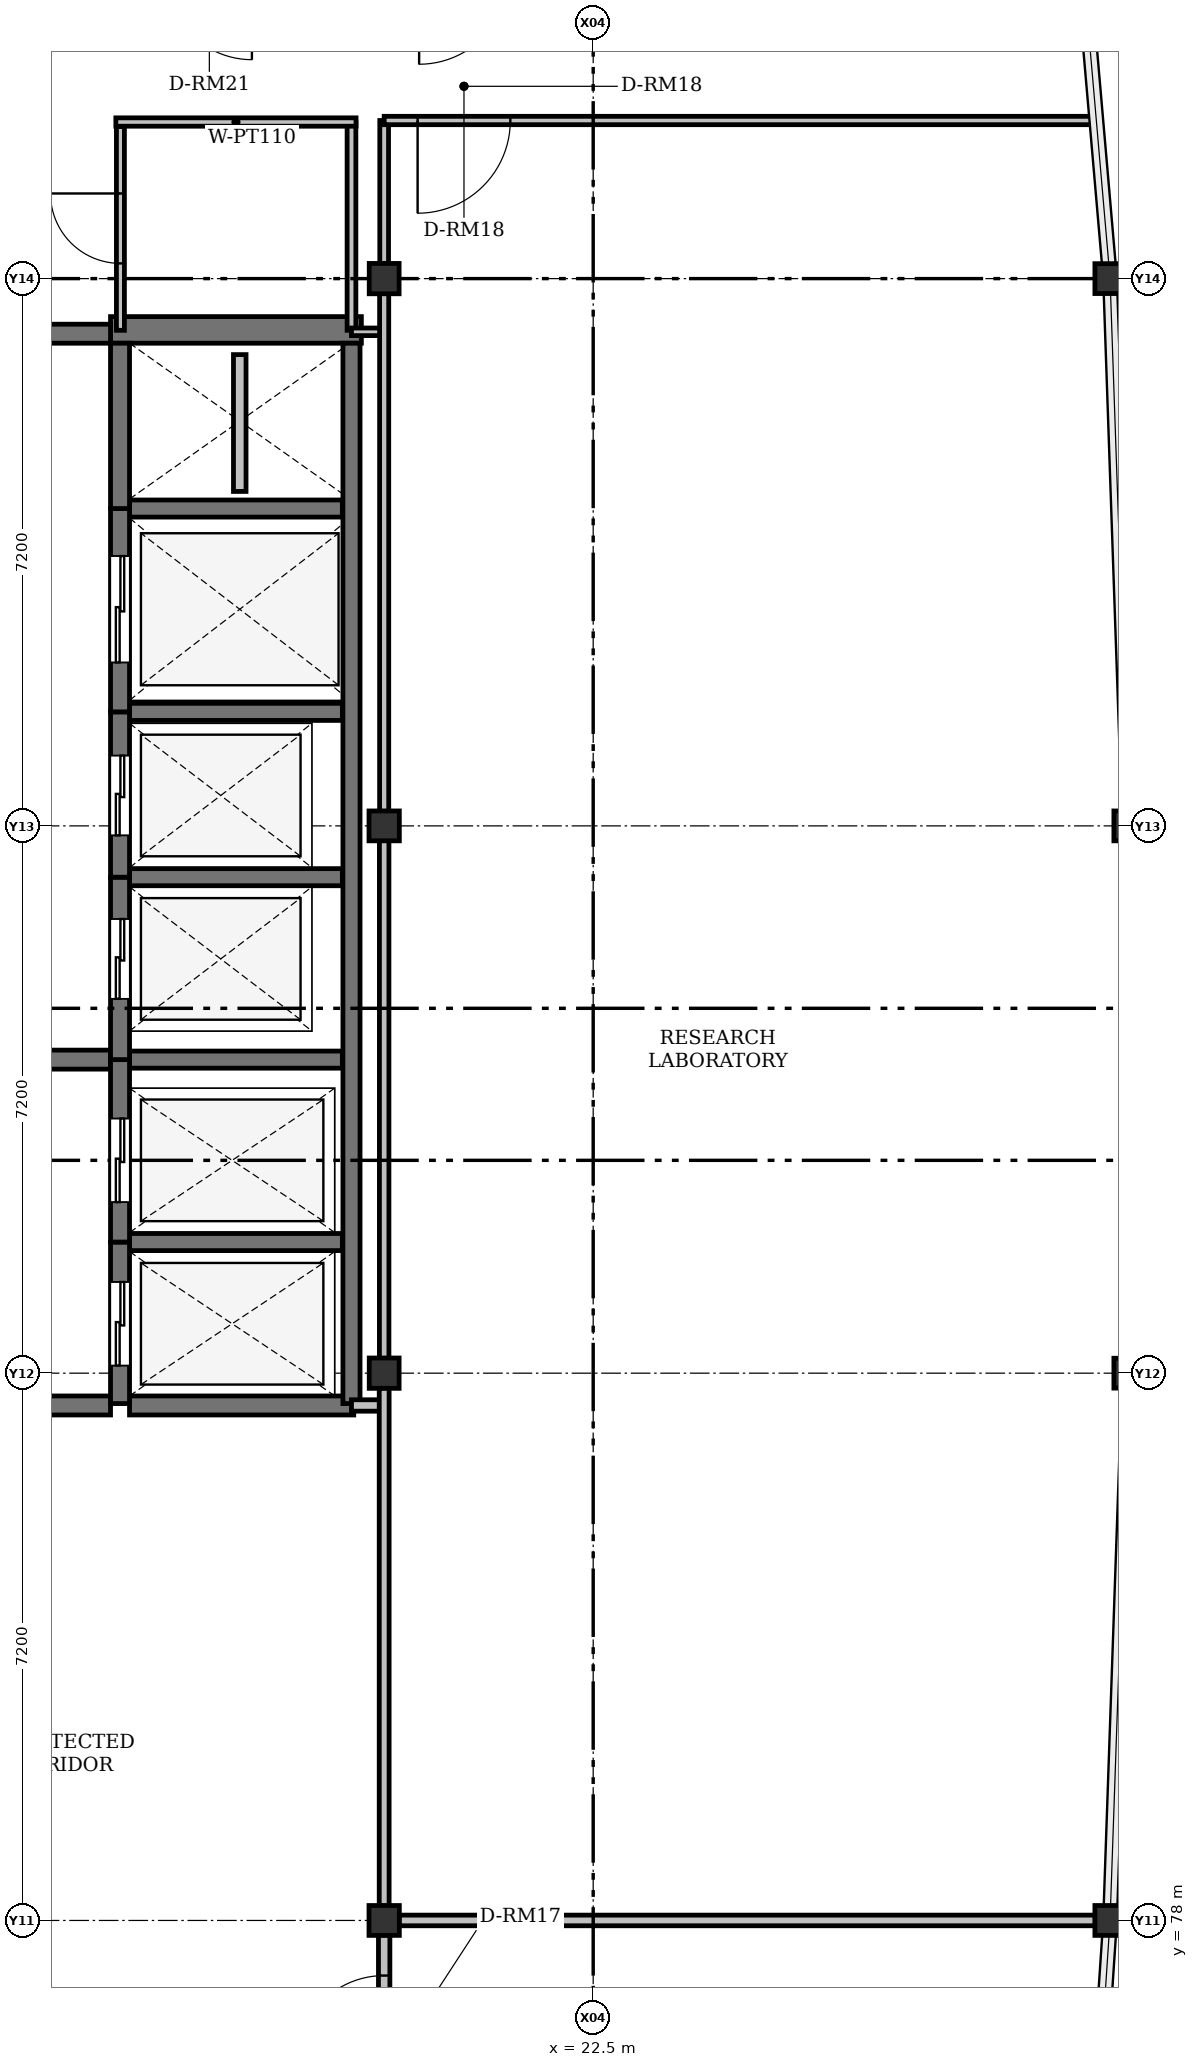
"""IFC4 building model, lengths in metres.
Left out: names, types, materials, properties, quantities, classifications, styles, units other than length and angle.
Written with IfcOpenShell. Run it as: python <this file> out.ifc"""

import sys

from ifc_helpers import new_model, si_unit, direction, frame, frame_2d, origin, origin_2d, place, context, subcontext, project, spatial, rectangle, i_section, extrude, element, fill, save


model = new_model("IFC4")
c1 = context("Model", 3, precision=1e-05, world=origin(), true_north=direction((0.0, 1.0)))
c2 = subcontext(c1, "Body", "Model", "MODEL_VIEW")
j1 = project(units=[si_unit("LENGTHUNIT", "METRE"), si_unit("PLANEANGLEUNIT", "RADIAN")], contexts=[c1])
p1 = place(None, origin())
s1 = spatial("IfcSite", under=j1, at=p1, CompositionType="ELEMENT")
p2 = place(p1, origin())
s2 = spatial("IfcBuilding", under=s1, at=p2, CompositionType="ELEMENT")
p3 = place(p2, origin())
s3 = spatial("IfcBuildingStorey", under=s2, at=p3, CompositionType="ELEMENT", Elevation=0.0)
for number, where, z_axis, x_axis in (
    (1, (19.75, 78.0, 0.0), (0.0, 0.0, 1.0), (1.0, 0.0, 0.0)),
    (2, (29.3, 78.0, 0.0), (0.0, 0.0, 1.0), (1.0, 0.0, 0.0)),
    (3, (19.75, 85.2, 0.0), (0.0, 0.0, 1.0), (0.0, 1.0, 0.0)),
    (4, (29.55, 85.2, 0.0), (0.0, 0.0, 1.0), (1.0, 0.0, 0.0)),
    (5, (19.75, 92.4, 0.0), (0.0, 0.0, 1.0), (1.0, 0.0, 0.0)),
    (6, (29.55, 92.4, 0.0), (0.0, 0.0, 1.0), (1.0, 0.0, 0.0)),
    (7, (19.75, 99.6, 0.0), (0.0, 0.0, 1.0), (0.0, 1.0, 0.0)),
    (8, (29.3, 99.6, 0.0), (0.0, 0.0, 1.0), (1.0, 0.0, 0.0)),
):
    element("IfcColumn", number, at=place(p3, frame(where, z_axis=z_axis, x_axis=x_axis)), inside=s3, PredefinedType="COLUMN", context=c2, shape_type="SweptSolid", body=[
        extrude(i_section(OverallWidth=0.399, OverallDepth=0.393, WebThickness=0.023, FlangeThickness=0.036, FilletRadius=0.015, at=origin_2d()), origin(), (0.0, 0.0, 1.0), 5.4),
    ])
p4 = place(p3, frame((16.15, 98.925, 0.0), z_axis=(0.0, 0.0, 1.0), x_axis=(1.0, 0.0, 0.0)))
e9 = element("IfcWall", 9, at=p4, inside=s3, PredefinedType="SHEAR", context=c2, shape_type="SweptSolid", body=[
    extrude(rectangle(XDim=3.3, YDim=0.35, at=frame_2d((1.65, 0.0))), origin(), (0.0, 0.0, 1.0), 5.4),
])
p5 = place(p3, frame((12.12, 98.875, 0.0), z_axis=(0.0, 0.0, 1.0), x_axis=(1.0, 0.0, 0.0)))
e10 = element("IfcWall", 10, at=p5, inside=s3, PredefinedType="SHEAR", context=c2, shape_type="SweptSolid", body=[
    extrude(rectangle(XDim=4.03, YDim=0.25, at=frame_2d((2.015, 0.0))), origin(), (0.0, 0.0, 1.0), 5.4),
])
p6 = place(p5, frame((1.35, 0.0, 0.0)))
e11 = element("IfcOpeningElement", 11, at=p6, cuts=e10, PredefinedType="OPENING", context=c2, shape_type="SweptSolid", body=[
    extrude(rectangle(XDim=1.3, YDim=2.2, at=frame_2d((0.65, 1.1))), frame((0.0, 0.125, 0.0), z_axis=(0.0, -1.0, 0.0), x_axis=(1.0, 0.0, 0.0)), (0.0, 0.0, 1.0), 0.25),
])
p7 = place(p3, frame((12.12, 89.325, 0.0), z_axis=(0.0, 0.0, 1.0), x_axis=(1.0, 0.0, 0.0)))
e12 = element("IfcWall", 12, at=p7, inside=s3, PredefinedType="SHEAR", context=c2, shape_type="SweptSolid", body=[
    extrude(rectangle(XDim=4.03, YDim=0.25, at=frame_2d((2.015, 0.0))), origin(), (0.0, 0.0, 1.0), 5.4),
])
p8 = place(p7, frame((1.35, 0.0, 0.0)))
e13 = element("IfcOpeningElement", 13, at=p8, cuts=e12, PredefinedType="OPENING", context=c2, shape_type="SweptSolid", body=[
    extrude(rectangle(XDim=1.3, YDim=2.2, at=frame_2d((0.65, 1.1))), frame((0.0, 0.125, 0.0), z_axis=(0.0, -1.0, 0.0), x_axis=(1.0, 0.0, 0.0)), (0.0, 0.0, 1.0), 0.25),
])
p9 = place(p3, frame((12.12, 84.775, 0.0), z_axis=(0.0, 0.0, 1.0), x_axis=(1.0, 0.0, 0.0)))
e14 = element("IfcWall", 14, at=p9, inside=s3, PredefinedType="SHEAR", context=c2, shape_type="SweptSolid", body=[
    extrude(rectangle(XDim=4.03, YDim=0.25, at=frame_2d((2.015, 0.0))), origin(), (0.0, 0.0, 1.0), 5.4),
])
p10 = place(p9, frame((1.3, 0.0, 0.0)))
e15 = element("IfcOpeningElement", 15, at=p10, cuts=e14, PredefinedType="OPENING", context=c2, shape_type="SweptSolid", body=[
    extrude(rectangle(XDim=1.4, YDim=2.25, at=frame_2d((0.7, 1.125))), frame((0.0, 0.125, 0.0), z_axis=(0.0, -1.0, 0.0), x_axis=(1.0, 0.0, 0.0)), (0.0, 0.0, 1.0), 0.25),
])
p11 = place(p3, frame((16.4, 84.775, 0.0), z_axis=(0.0, 0.0, 1.0), x_axis=(1.0, 0.0, 0.0)))
e16 = element("IfcWall", 16, at=p11, inside=s3, PredefinedType="SHEAR", context=c2, shape_type="SweptSolid", body=[
    extrude(rectangle(XDim=2.95, YDim=0.25, at=frame_2d((1.475, 0.0))), origin(), (0.0, 0.0, 1.0), 5.4),
])
p12 = place(p3, frame((19.32, 84.8, 0.0), z_axis=(0.0, 0.0, 1.0), x_axis=(0.0, 1.0, 0.0)))
e17 = element("IfcWall", 17, at=p12, inside=s3, PredefinedType="SHEAR", context=c2, shape_type="SweptSolid", body=[
    extrude(rectangle(XDim=13.95, YDim=0.225, at=frame_2d((6.975, 0.0))), origin(), (0.0, 0.0, 1.0), 5.4),
])
for number, where, z_axis, x_axis in (
    (18, (16.4, 86.925, 0.0), (0.0, 0.0, 1.0), (1.0, 0.0, 0.0)),
    (19, (16.4, 89.325, 0.0), (0.0, 0.0, 1.0), (1.0, 0.0, 0.0)),
    (20, (16.4, 91.725, 0.0), (0.0, 0.0, 1.0), (1.0, 0.0, 0.0)),
    (21, (16.4, 93.9, 0.0), (0.0, 0.0, 1.0), (1.0, 0.0, 0.0)),
    (22, (16.4, 96.575, 0.0), (0.0, 0.0, 1.0), (1.0, 0.0, 0.0)),
):
    element("IfcWall", number, at=place(p3, frame(where, z_axis=z_axis, x_axis=x_axis)), inside=s3, PredefinedType="SHEAR", context=c2, shape_type="SweptSolid", body=[
        extrude(rectangle(XDim=2.8, YDim=0.225, at=frame_2d((1.4, 0.0))), origin(), (0.0, 0.0, 1.0), 5.4),
    ])
p13 = place(p3, frame((16.275, 84.8, 0.0), z_axis=(0.0, 0.0, 1.0), x_axis=(0.0, 1.0, 0.0)))
e23 = element("IfcWall", 23, at=p13, inside=s3, PredefinedType="SHEAR", context=c2, shape_type="SweptSolid", body=[
    extrude(rectangle(XDim=2.125, YDim=0.25, at=frame_2d((1.062, 0.0))), origin(), (0.0, 0.0, 1.0), 5.4),
])
p14 = place(p13, frame((0.5, 0.0, 0.0)))
e24 = element("IfcOpeningElement", 24, at=p14, cuts=e23, PredefinedType="OPENING", context=c2, shape_type="SweptSolid", body=[
    extrude(rectangle(XDim=1.1, YDim=2.15, at=frame_2d((0.55, 1.075))), frame((0.0, 0.125, 0.0), z_axis=(0.0, -1.0, 0.0), x_axis=(1.0, 0.0, 0.0)), (0.0, 0.0, 1.0), 0.25),
])
p15 = place(p3, frame((16.275, 86.925, 0.0), z_axis=(0.0, 0.0, 1.0), x_axis=(0.0, 1.0, 0.0)))
e25 = element("IfcWall", 25, at=p15, inside=s3, PredefinedType="SHEAR", context=c2, shape_type="SweptSolid", body=[
    extrude(rectangle(XDim=2.4, YDim=0.25, at=frame_2d((1.2, 0.0))), origin(), (0.0, 0.0, 1.0), 5.4),
])
p16 = place(p15, frame((0.525, 0.0, 0.0)))
e26 = element("IfcOpeningElement", 26, at=p16, cuts=e25, PredefinedType="OPENING", context=c2, shape_type="SweptSolid", body=[
    extrude(rectangle(XDim=1.1, YDim=2.15, at=frame_2d((0.55, 1.075))), frame((0.0, 0.125, 0.0), z_axis=(0.0, -1.0, 0.0), x_axis=(1.0, 0.0, 0.0)), (0.0, 0.0, 1.0), 0.25),
])
p17 = place(p3, frame((16.275, 89.325, 0.0), z_axis=(0.0, 0.0, 1.0), x_axis=(0.0, 1.0, 0.0)))
e27 = element("IfcWall", 27, at=p17, inside=s3, PredefinedType="SHEAR", context=c2, shape_type="SweptSolid", body=[
    extrude(rectangle(XDim=2.4, YDim=0.25, at=frame_2d((1.2, 0.0))), origin(), (0.0, 0.0, 1.0), 5.4),
])
p18 = place(p17, frame((0.8, 0.0, 0.0)))
e28 = element("IfcOpeningElement", 28, at=p18, cuts=e27, PredefinedType="OPENING", context=c2, shape_type="SweptSolid", body=[
    extrude(rectangle(XDim=1.05, YDim=2.15, at=frame_2d((0.525, 1.075))), frame((0.0, 0.125, 0.0), z_axis=(0.0, -1.0, 0.0), x_axis=(1.0, 0.0, 0.0)), (0.0, 0.0, 1.0), 0.25),
])
p19 = place(p3, frame((16.275, 91.725, 0.0), z_axis=(0.0, 0.0, 1.0), x_axis=(0.0, 1.0, 0.0)))
e29 = element("IfcWall", 29, at=p19, inside=s3, PredefinedType="SHEAR", context=c2, shape_type="SweptSolid", body=[
    extrude(rectangle(XDim=2.175, YDim=0.25, at=frame_2d((1.087, 0.0))), origin(), (0.0, 0.0, 1.0), 5.4),
])
p20 = place(p19, frame((0.55, 0.0, 0.0)))
e30 = element("IfcOpeningElement", 30, at=p20, cuts=e29, PredefinedType="OPENING", context=c2, shape_type="SweptSolid", body=[
    extrude(rectangle(XDim=1.05, YDim=2.15, at=frame_2d((0.525, 1.075))), frame((0.0, 0.125, 0.0), z_axis=(0.0, -1.0, 0.0), x_axis=(1.0, 0.0, 0.0)), (0.0, 0.0, 1.0), 0.25),
])
p21 = place(p3, frame((16.275, 93.9, 0.0), z_axis=(0.0, 0.0, 1.0), x_axis=(0.0, 1.0, 0.0)))
e31 = element("IfcWall", 31, at=p21, inside=s3, PredefinedType="SHEAR", context=c2, shape_type="SweptSolid", body=[
    extrude(rectangle(XDim=2.675, YDim=0.25, at=frame_2d((1.337, 0.0))), origin(), (0.0, 0.0, 1.0), 5.4),
])
p22 = place(p21, frame((0.65, 0.0, 0.0)))
e32 = element("IfcOpeningElement", 32, at=p22, cuts=e31, PredefinedType="OPENING", context=c2, shape_type="SweptSolid", body=[
    extrude(rectangle(XDim=1.4, YDim=2.25, at=frame_2d((0.7, 1.125))), frame((0.0, 0.125, 0.0), z_axis=(0.0, -1.0, 0.0), x_axis=(1.0, 0.0, 0.0)), (0.0, 0.0, 1.0), 0.25),
])
p23 = place(p3, frame((16.275, 96.575, 0.0), z_axis=(0.0, 0.0, 1.0), x_axis=(0.0, 1.0, 0.0)))
e33 = element("IfcWall", 33, at=p23, inside=s3, PredefinedType="SHEAR", context=c2, shape_type="SweptSolid", body=[
    extrude(rectangle(XDim=2.175, YDim=0.25, at=frame_2d((1.087, 0.0))), origin(), (0.0, 0.0, 1.0), 5.4),
])
p24 = place(p3, frame((17.85, 96.8, 0.0), z_axis=(0.0, 0.0, 1.0), x_axis=(0.0, 1.0, 0.0)))
e34 = element("IfcWall", 34, at=p24, inside=s3, PredefinedType="PLUMBINGWALL", context=c2, shape_type="SweptSolid", body=[
    extrude(rectangle(XDim=1.8, YDim=0.165, at=frame_2d((0.9, 0.0))), origin(), (0.0, 0.0, 1.0), 5.4),
])
p25 = place(p3, frame((19.32, 98.92, 0.0), z_axis=(0.0, 0.0, 1.0), x_axis=(0.0, 1.0, 0.0)))
e35 = element("IfcWall", 35, at=p25, inside=s3, PredefinedType="PARTITIONING", context=c2, shape_type="SweptSolid", body=[
    extrude(rectangle(XDim=2.74, YDim=0.115, at=frame_2d((1.37, 0.0))), origin(), (0.0, 0.0, 1.0), 4.651),
])
p26 = place(p3, frame((19.38, 101.66, 0.0), z_axis=(0.0, 0.0, 1.0), x_axis=(-1.0, 0.0, 0.0)))
e36 = element("IfcWall", 36, at=p26, inside=s3, PredefinedType="PARTITIONING", context=c2, shape_type="SweptSolid", body=[
    extrude(rectangle(XDim=3.16, YDim=0.11, at=frame_2d((1.58, 0.0))), origin(), (0.0, 0.0, 1.0), 5.15),
])
p27 = place(p3, frame((16.28, 98.92, 0.0), z_axis=(0.0, 0.0, 1.0), x_axis=(0.0, 1.0, 0.0)))
e37 = element("IfcWall", 37, at=p27, inside=s3, PredefinedType="PARTITIONING", context=c2, shape_type="SweptSolid", body=[
    extrude(rectangle(XDim=2.68, YDim=0.105, at=frame_2d((1.34, 0.0))), origin(), (0.0, 0.0, 1.0), 4.651),
])
p28 = place(p27, frame((0.88, 0.0, 0.0)))
e38 = element("IfcOpeningElement", 38, at=p28, cuts=e37, PredefinedType="OPENING", context=c2, shape_type="SweptSolid", body=[
    extrude(rectangle(XDim=0.92, YDim=2.15, at=frame_2d((0.46, 1.075))), frame((0.0, 0.052, 0.0), z_axis=(0.0, -1.0, 0.0), x_axis=(1.0, 0.0, 0.0)), (0.0, 0.0, 1.0), 0.105),
])
p29 = place(p3, frame((19.75, 98.9, 0.0), z_axis=(0.0, 0.0, 1.0), x_axis=(-1.0, 0.0, 0.0)))
e39 = element("IfcWall", 39, at=p29, inside=s3, PredefinedType="PARTITIONING", context=c2, shape_type="SweptSolid", body=[
    extrude(rectangle(XDim=0.43, YDim=0.1, at=frame_2d((0.215, 0.0))), origin(), (0.0, 0.0, 1.0), 4.727),
])
p30 = place(p3, frame((19.32, 84.775, 0.0), z_axis=(0.0, 0.0, 1.0), x_axis=(1.0, 0.0, 0.0)))
e40 = element("IfcWall", 40, at=p30, inside=s3, PredefinedType="PARTITIONING", context=c2, shape_type="SweptSolid", body=[
    extrude(rectangle(XDim=0.43, YDim=0.15, at=frame_2d((0.215, 0.0))), origin(), (0.0, 0.0, 1.0), 4.727),
])
p31 = place(p3, frame((19.75, 70.695, 0.0), z_axis=(0.0, 0.0, 1.0), x_axis=(0.0, 1.0, 0.0)))
e41 = element("IfcWall", 41, at=p31, inside=s3, PredefinedType="PARTITIONING", context=c2, shape_type="SweptSolid", body=[
    extrude(rectangle(XDim=7.114, YDim=0.15, at=frame_2d((3.557, 0.0))), origin(), (0.0, 0.0, 1.0), 4.727),
])
p32 = place(p31, frame((5.43, 0.0, 0.0)))
e42 = element("IfcOpeningElement", 42, at=p32, cuts=e41, PredefinedType="OPENING", context=c2, shape_type="SweptSolid", body=[
    extrude(rectangle(XDim=1.15, YDim=2.2, at=frame_2d((0.575, 1.1))), frame((0.0, 0.075, 0.0), z_axis=(0.0, -1.0, 0.0), x_axis=(1.0, 0.0, 0.0)), (0.0, 0.0, 1.0), 0.15),
])
p33 = place(p3, frame((19.945, 78.0, 0.0), z_axis=(0.0, 0.0, 1.0), x_axis=(1.0, 0.0, 0.0)))
e43 = element("IfcWall", 43, at=p33, inside=s3, PredefinedType="PARTITIONING", context=c2, shape_type="SweptSolid", body=[
    extrude(rectangle(XDim=9.161, YDim=0.14, at=frame_2d((4.581, 0.0))), origin(), (0.0, 0.0, 1.0), 4.651),
])
p34 = place(p3, frame((19.75, 85.006, 0.0), z_axis=(0.0, 0.0, 1.0), x_axis=(0.0, -1.0, 0.0)))
e44 = element("IfcWall", 44, at=p34, inside=s3, PredefinedType="PARTITIONING", context=c2, shape_type="SweptSolid", body=[
    extrude(rectangle(XDim=6.814, YDim=0.13, at=frame_2d((3.407, 0.0))), origin(), (0.0, 0.0, 1.0), 4.727),
])
p35 = place(p3, frame((19.75, 92.208, 0.0), z_axis=(0.0, 0.0, 1.0), x_axis=(0.0, -1.0, 0.0)))
e45 = element("IfcWall", 45, at=p35, inside=s3, PredefinedType="PARTITIONING", context=c2, shape_type="SweptSolid", body=[
    extrude(rectangle(XDim=6.814, YDim=0.125, at=frame_2d((3.407, 0.0))), origin(), (0.0, 0.0, 1.0), 4.727),
])
p36 = place(p3, frame((19.75, 99.406, 0.0), z_axis=(0.0, 0.0, 1.0), x_axis=(0.0, -1.0, 0.0)))
e46 = element("IfcWall", 46, at=p36, inside=s3, PredefinedType="PARTITIONING", context=c2, shape_type="SweptSolid", body=[
    extrude(rectangle(XDim=6.814, YDim=0.12, at=frame_2d((3.407, 0.0))), origin(), (0.0, 0.0, 1.0), 4.727),
])
p37 = place(p3, frame((19.75, 101.68, 0.0), z_axis=(0.0, 0.0, 1.0), x_axis=(0.0, -1.0, 0.0)))
e47 = element("IfcWall", 47, at=p37, inside=s3, PredefinedType="PARTITIONING", context=c2, shape_type="SweptSolid", body=[
    extrude(rectangle(XDim=1.885, YDim=0.115, at=frame_2d((0.943, 0.0))), origin(), (0.0, 0.0, 1.0), 4.727),
])
p38 = place(p3, frame((29.165, 101.68, 0.0), z_axis=(0.0, 0.0, 1.0), x_axis=(-1.0, 0.0, 0.0)))
e48 = element("IfcWall", 48, at=p38, inside=s3, PredefinedType="PARTITIONING", context=c2, shape_type="SweptSolid", body=[
    extrude(rectangle(XDim=9.415, YDim=0.11, at=frame_2d((4.708, 0.0))), origin(), (0.0, 0.0, 1.0), 4.727),
])
p39 = place(p38, frame((7.755, 0.0, 0.0)))
e49 = element("IfcOpeningElement", 49, at=p39, cuts=e48, PredefinedType="OPENING", context=c2, shape_type="SweptSolid", body=[
    extrude(rectangle(XDim=1.22, YDim=2.2, at=frame_2d((0.61, 1.1))), frame((0.0, 0.055, 0.0), z_axis=(0.0, -1.0, 0.0), x_axis=(1.0, 0.0, 0.0)), (0.0, 0.0, 1.0), 0.11),
])
p40 = place(p14, origin())
e50 = element("IfcDoor", 50, at=p40, inside=s3, OperationType="SLIDING_TO_LEFT", PredefinedType="DOOR", context=c2, shape_type="SweptSolid", body=[
    extrude(rectangle(XDim=1.1, YDim=2.15, at=frame_2d((0.55, 1.075))), frame((0.0, 0.025, 0.0), z_axis=(0.0, -1.0, 0.0), x_axis=(1.0, 0.0, 0.0)), (0.0, 0.0, 1.0), 0.05),
])
fill(e24, e50)
p41 = place(p16, origin())
e51 = element("IfcDoor", 51, at=p41, inside=s3, OperationType="SLIDING_TO_LEFT", PredefinedType="DOOR", context=c2, shape_type="SweptSolid", body=[
    extrude(rectangle(XDim=1.1, YDim=2.15, at=frame_2d((0.55, 1.075))), frame((0.0, 0.025, 0.0), z_axis=(0.0, -1.0, 0.0), x_axis=(1.0, 0.0, 0.0)), (0.0, 0.0, 1.0), 0.05),
])
fill(e26, e51)
p42 = place(p18, origin())
e52 = element("IfcDoor", 52, at=p42, inside=s3, OperationType="SLIDING_TO_LEFT", PredefinedType="DOOR", context=c2, shape_type="SweptSolid", body=[
    extrude(rectangle(XDim=1.05, YDim=2.15, at=frame_2d((0.525, 1.075))), frame((0.0, 0.025, 0.0), z_axis=(0.0, -1.0, 0.0), x_axis=(1.0, 0.0, 0.0)), (0.0, 0.0, 1.0), 0.05),
])
fill(e28, e52)
p43 = place(p20, origin())
e53 = element("IfcDoor", 53, at=p43, inside=s3, OperationType="SLIDING_TO_LEFT", PredefinedType="DOOR", context=c2, shape_type="SweptSolid", body=[
    extrude(rectangle(XDim=1.05, YDim=2.15, at=frame_2d((0.525, 1.075))), frame((0.0, 0.025, 0.0), z_axis=(0.0, -1.0, 0.0), x_axis=(1.0, 0.0, 0.0)), (0.0, 0.0, 1.0), 0.05),
])
fill(e30, e53)
p44 = place(p22, origin())
e54 = element("IfcDoor", 54, at=p44, inside=s3, OperationType="SLIDING_TO_LEFT", PredefinedType="DOOR", context=c2, shape_type="SweptSolid", body=[
    extrude(rectangle(XDim=1.4, YDim=2.25, at=frame_2d((0.7, 1.125))), frame((0.0, 0.025, 0.0), z_axis=(0.0, -1.0, 0.0), x_axis=(1.0, 0.0, 0.0)), (0.0, 0.0, 1.0), 0.05),
])
fill(e32, e54)
p45 = place(p28, origin())
e55 = element("IfcDoor", 55, at=p45, inside=s3, OperationType="SINGLE_SWING_RIGHT", PredefinedType="DOOR", context=c2, shape_type="SweptSolid", body=[
    extrude(rectangle(XDim=0.92, YDim=2.15, at=frame_2d((0.46, 1.075))), frame((0.0, 0.025, 0.0), z_axis=(0.0, -1.0, 0.0), x_axis=(1.0, 0.0, 0.0)), (0.0, 0.0, 1.0), 0.05),
])
fill(e38, e55)
p46 = place(p32, origin())
e56 = element("IfcDoor", 56, at=p46, inside=s3, OperationType="SINGLE_SWING_LEFT", PredefinedType="DOOR", context=c2, shape_type="SweptSolid", body=[
    extrude(rectangle(XDim=1.15, YDim=2.2, at=frame_2d((0.575, 1.1))), frame((0.0, 0.025, 0.0), z_axis=(0.0, -1.0, 0.0), x_axis=(1.0, 0.0, 0.0)), (0.0, 0.0, 1.0), 0.05),
])
fill(e42, e56)
p47 = place(p39, origin())
e57 = element("IfcDoor", 57, at=p47, inside=s3, OperationType="SINGLE_SWING_RIGHT", PredefinedType="DOOR", context=c2, shape_type="SweptSolid", body=[
    extrude(rectangle(XDim=1.22, YDim=2.2, at=frame_2d((0.61, 1.1))), frame((0.0, 0.025, 0.0), z_axis=(0.0, -1.0, 0.0), x_axis=(1.0, 0.0, 0.0)), (0.0, 0.0, 1.0), 0.05),
])
fill(e49, e57)
save(model, sys.argv[1])
